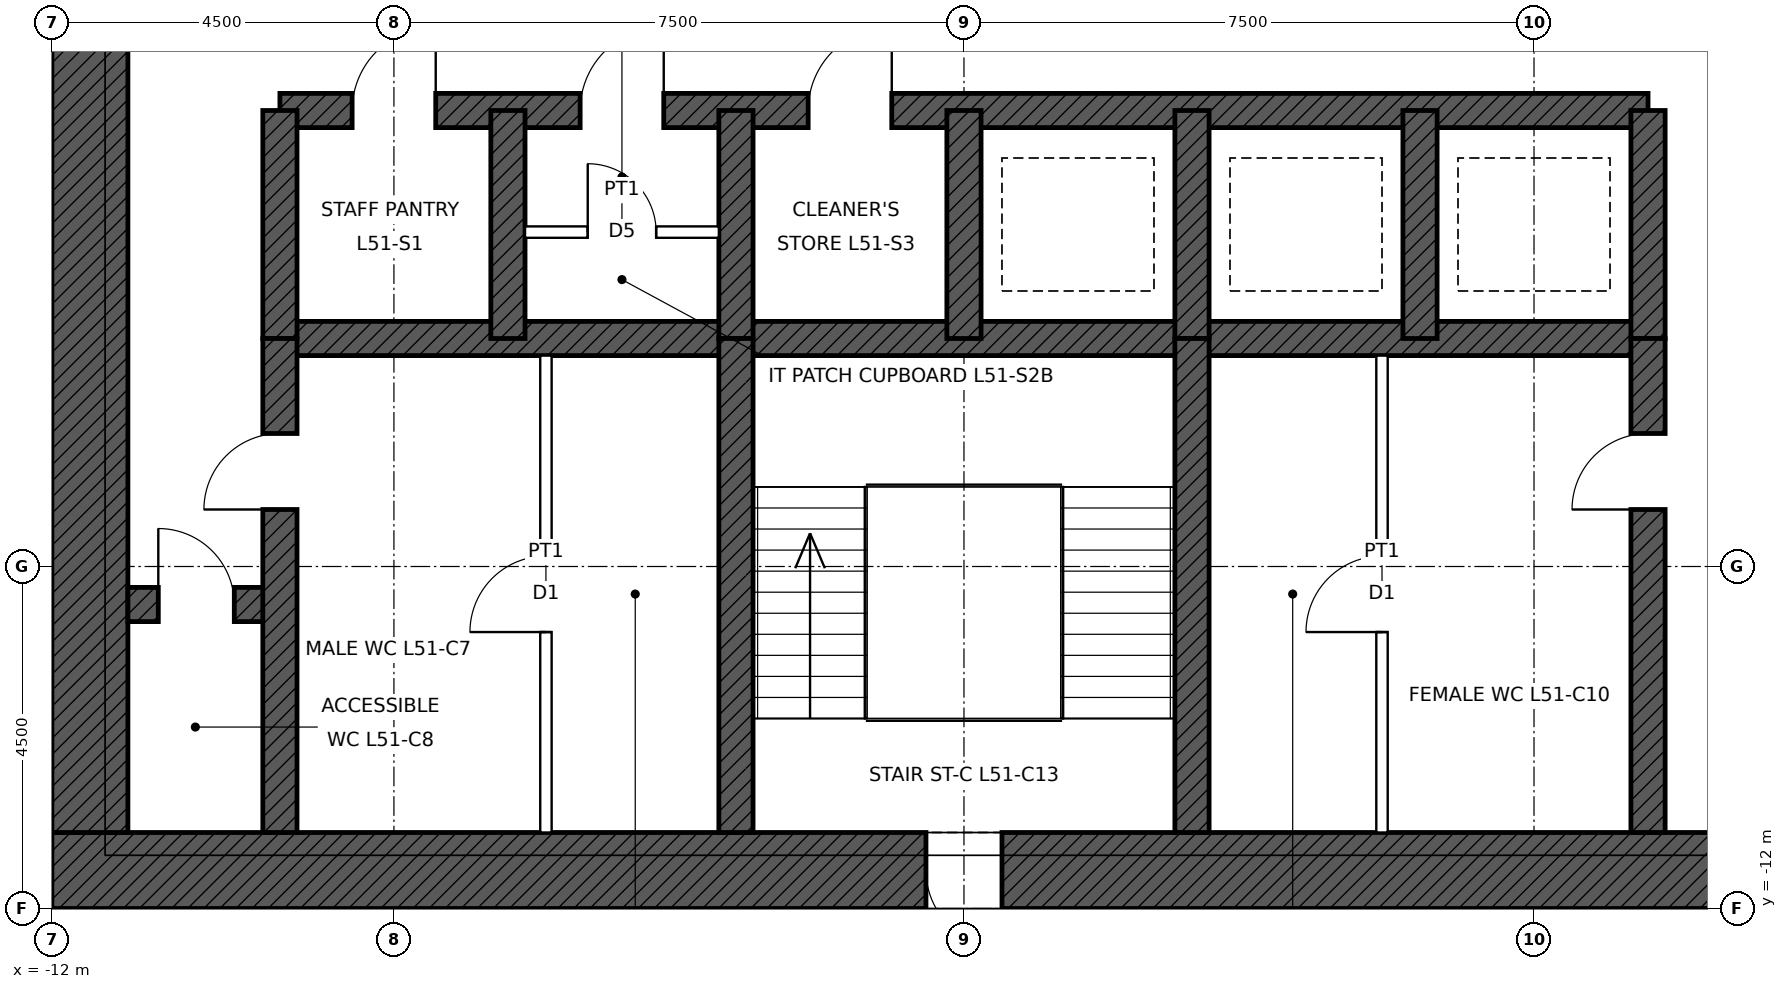
"""IFC4 building model, lengths in metres.
Left out: names, types, materials, properties, quantities, classifications, styles, units other than length and angle.
Written with IfcOpenShell. Run it as: python <this file> out.ifc"""

import sys

from ifc_helpers import new_model, si_unit, direction, frame, frame_2d, origin, place, context, subcontext, project, spatial, rectangle, extrude, element, fill, save


model = new_model("IFC4")
c1 = context("Model", 3, precision=1e-05, world=origin(), true_north=direction((0.0, 1.0)))
c2 = subcontext(c1, "Body", "Model", "MODEL_VIEW")
j1 = project(units=[si_unit("LENGTHUNIT", "METRE"), si_unit("PLANEANGLEUNIT", "RADIAN")], contexts=[c1])
p1 = place(None, origin())
s1 = spatial("IfcSite", under=j1, at=p1, CompositionType="ELEMENT")
p2 = place(p1, origin())
s2 = spatial("IfcBuilding", under=s1, at=p2, CompositionType="ELEMENT")
p3 = place(p2, frame((0.0, 0.0, 237.9)))
s3 = spatial("IfcBuildingStorey", under=s2, at=p3, CompositionType="ELEMENT", Elevation=237.9)
p4 = place(p3, frame((12.0, -11.5, 0.0), z_axis=(0.0, 0.0, 1.0), x_axis=(-1.0, 0.0, 0.0)))
e1 = element("IfcWall", 1, at=p4, inside=s3, PredefinedType="SHEAR", context=c2, shape_type="SweptSolid", body=[
    extrude(rectangle(XDim=24.0, YDim=1.0, at=frame_2d((12.0, 0.0))), origin(), (0.0, 0.0, 1.0), 4.0),
])
p5 = place(p4, frame((11.5, 0.0, 0.0)))
e2 = element("IfcOpeningElement", 2, at=p5, cuts=e1, PredefinedType="OPENING", context=c2, shape_type="SweptSolid", body=[
    extrude(rectangle(XDim=1.0, YDim=2.1, at=frame_2d((0.5, 1.05))), frame((0.0, 0.51, 0.0), z_axis=(0.0, -1.0, 0.0), x_axis=(1.0, 0.0, 0.0)), (0.0, 0.0, 1.0), 1.02),
])
p6 = place(p4, frame((1.0, 0.0, 0.0)))
e3 = element("IfcOpeningElement", 3, at=p6, cuts=e1, PredefinedType="OPENING", context=c2, shape_type="SweptSolid", body=[
    extrude(rectangle(XDim=1.0, YDim=2.4, at=frame_2d((0.5, 1.2))), frame((0.0, 0.51, 0.0), z_axis=(0.0, -1.0, 0.0), x_axis=(1.0, 0.0, 0.0)), (0.0, 0.0, 1.0), 1.02),
])
p7 = place(p3, frame((-11.5, -11.0, 0.0), z_axis=(0.0, 0.0, 1.0), x_axis=(0.0, 1.0, 0.0)))
e4 = element("IfcWall", 4, at=p7, inside=s3, PredefinedType="SHEAR", context=c2, shape_type="SweptSolid", body=[
    extrude(rectangle(XDim=22.0, YDim=1.0, at=frame_2d((11.0, 0.0))), origin(), (0.0, 0.0, 1.0), 4.0),
])
p8 = place(p7, frame((10.5, 0.0, 0.0)))
e5 = element("IfcOpeningElement", 5, at=p8, cuts=e4, PredefinedType="OPENING", context=c2, shape_type="SweptSolid", body=[
    extrude(rectangle(XDim=1.0, YDim=2.4, at=frame_2d((0.5, 1.2))), frame((0.0, 0.51, 0.0), z_axis=(0.0, -1.0, 0.0), x_axis=(1.0, 0.0, 0.0)), (0.0, 0.0, 1.0), 1.02),
])
p9 = place(p3, frame((-9.0, -1.5, 0.0), z_axis=(0.0, 0.0, 1.0), x_axis=(1.0, 0.0, 0.0)))
e6 = element("IfcWall", 6, at=p9, inside=s3, PredefinedType="SHEAR", context=c2, shape_type="SweptSolid", body=[
    extrude(rectangle(XDim=18.0, YDim=0.45, at=frame_2d((9.0, 0.0))), origin(), (0.0, 0.0, 1.0), 4.0),
])
p10 = place(p9, frame((0.95, 0.0, 0.0)))
e7 = element("IfcOpeningElement", 7, at=p10, cuts=e6, PredefinedType="OPENING", context=c2, shape_type="SweptSolid", body=[
    extrude(rectangle(XDim=1.1, YDim=2.1, at=frame_2d((0.55, 1.05))), frame((0.0, 0.235, 0.0), z_axis=(0.0, -1.0, 0.0), x_axis=(1.0, 0.0, 0.0)), (0.0, 0.0, 1.0), 0.47),
])
p11 = place(p9, frame((3.95, 0.0, 0.0)))
e8 = element("IfcOpeningElement", 8, at=p11, cuts=e6, PredefinedType="OPENING", context=c2, shape_type="SweptSolid", body=[
    extrude(rectangle(XDim=1.1, YDim=2.1, at=frame_2d((0.55, 1.05))), frame((0.0, 0.235, 0.0), z_axis=(0.0, -1.0, 0.0), x_axis=(1.0, 0.0, 0.0)), (0.0, 0.0, 1.0), 0.47),
])
p12 = place(p9, frame((6.95, 0.0, 0.0)))
e9 = element("IfcOpeningElement", 9, at=p12, cuts=e6, PredefinedType="OPENING", context=c2, shape_type="SweptSolid", body=[
    extrude(rectangle(XDim=1.1, YDim=2.1, at=frame_2d((0.55, 1.05))), frame((0.0, 0.235, 0.0), z_axis=(0.0, -1.0, 0.0), x_axis=(1.0, 0.0, 0.0)), (0.0, 0.0, 1.0), 0.47),
])
p13 = place(p3, frame((-9.0, -4.5, 0.0), z_axis=(0.0, 0.0, 1.0), x_axis=(1.0, 0.0, 0.0)))
e10 = element("IfcWall", 10, at=p13, inside=s3, PredefinedType="SHEAR", context=c2, shape_type="SweptSolid", body=[
    extrude(rectangle(XDim=18.0, YDim=0.45, at=frame_2d((9.0, 0.0))), origin(), (0.0, 0.0, 1.0), 4.0),
])
p14 = place(p3, frame((-11.0, -8.0, 0.0), z_axis=(0.0, 0.0, 1.0), x_axis=(1.0, 0.0, 0.0)))
e11 = element("IfcWall", 11, at=p14, inside=s3, PredefinedType="SHEAR", context=c2, shape_type="SweptSolid", body=[
    extrude(rectangle(XDim=2.0, YDim=0.45, at=frame_2d((1.0, 0.0))), origin(), (0.0, 0.0, 1.0), 4.0),
])
p15 = place(p14, frame((0.4, 0.0, 0.0)))
e12 = element("IfcOpeningElement", 12, at=p15, cuts=e11, PredefinedType="OPENING", context=c2, shape_type="SweptSolid", body=[
    extrude(rectangle(XDim=1.0, YDim=2.1, at=frame_2d((0.5, 1.05))), frame((0.0, 0.235, 0.0), z_axis=(0.0, -1.0, 0.0), x_axis=(1.0, 0.0, 0.0)), (0.0, 0.0, 1.0), 0.47),
])
for number, where, z_axis, x_axis in (
    (13, (-9.0, -4.5, 0.0), (0.0, 0.0, 1.0), (0.0, 1.0, 0.0)),
    (14, (9.0, -4.5, 0.0), (0.0, 0.0, 1.0), (0.0, 1.0, 0.0)),
    (15, (-6.0, -4.5, 0.0), (0.0, 0.0, 1.0), (0.0, 1.0, 0.0)),
    (16, (-3.0, -4.5, 0.0), (0.0, 0.0, 1.0), (0.0, 1.0, 0.0)),
    (17, (0.0, -4.5, 0.0), (0.0, 0.0, 1.0), (0.0, 1.0, 0.0)),
    (18, (3.0, -4.5, 0.0), (0.0, 0.0, 1.0), (0.0, 1.0, 0.0)),
    (19, (6.0, -4.5, 0.0), (0.0, 0.0, 1.0), (0.0, 1.0, 0.0)),
):
    element("IfcWall", number, at=place(p3, frame(where, z_axis=z_axis, x_axis=x_axis)), inside=s3, PredefinedType="SHEAR", context=c2, shape_type="SweptSolid", body=[
        extrude(rectangle(XDim=3.0, YDim=0.45, at=frame_2d((1.5, 0.0))), origin(), (0.0, 0.0, 1.0), 4.0),
    ])
p16 = place(p3, frame((-9.0, -11.0, 0.0), z_axis=(0.0, 0.0, 1.0), x_axis=(0.0, 1.0, 0.0)))
e20 = element("IfcWall", 20, at=p16, inside=s3, PredefinedType="SHEAR", context=c2, shape_type="SweptSolid", body=[
    extrude(rectangle(XDim=6.5, YDim=0.45, at=frame_2d((3.25, 0.0))), origin(), (0.0, 0.0, 1.0), 4.0),
])
p17 = place(p16, frame((4.25, 0.0, 0.0)))
e21 = element("IfcOpeningElement", 21, at=p17, cuts=e20, PredefinedType="OPENING", context=c2, shape_type="SweptSolid", body=[
    extrude(rectangle(XDim=1.0, YDim=2.1, at=frame_2d((0.5, 1.05))), frame((0.0, 0.235, 0.0), z_axis=(0.0, -1.0, 0.0), x_axis=(1.0, 0.0, 0.0)), (0.0, 0.0, 1.0), 0.47),
])
p18 = place(p3, frame((9.0, -11.0, 0.0), z_axis=(0.0, 0.0, 1.0), x_axis=(0.0, 1.0, 0.0)))
e22 = element("IfcWall", 22, at=p18, inside=s3, PredefinedType="SHEAR", context=c2, shape_type="SweptSolid", body=[
    extrude(rectangle(XDim=6.5, YDim=0.45, at=frame_2d((3.25, 0.0))), origin(), (0.0, 0.0, 1.0), 4.0),
])
p19 = place(p18, frame((4.25, 0.0, 0.0)))
e23 = element("IfcOpeningElement", 23, at=p19, cuts=e22, PredefinedType="OPENING", context=c2, shape_type="SweptSolid", body=[
    extrude(rectangle(XDim=1.0, YDim=2.1, at=frame_2d((0.5, 1.05))), frame((0.0, 0.235, 0.0), z_axis=(0.0, -1.0, 0.0), x_axis=(1.0, 0.0, 0.0)), (0.0, 0.0, 1.0), 0.47),
])
for number, where, z_axis, x_axis in (
    (24, (-3.0, -11.0, 0.0), (0.0, 0.0, 1.0), (0.0, 1.0, 0.0)),
    (25, (3.0, -11.0, 0.0), (0.0, 0.0, 1.0), (0.0, 1.0, 0.0)),
):
    element("IfcWall", number, at=place(p3, frame(where, z_axis=z_axis, x_axis=x_axis)), inside=s3, PredefinedType="SHEAR", context=c2, shape_type="SweptSolid", body=[
        extrude(rectangle(XDim=6.5, YDim=0.45, at=frame_2d((3.25, 0.0))), origin(), (0.0, 0.0, 1.0), 4.0),
    ])
p20 = place(p3, frame((-5.5, -11.0, 0.0), z_axis=(0.0, 0.0, 1.0), x_axis=(0.0, 1.0, 0.0)))
e26 = element("IfcWall", 26, at=p20, inside=s3, PredefinedType="PARTITIONING", context=c2, shape_type="SweptSolid", body=[
    extrude(rectangle(XDim=6.275, YDim=0.15, at=frame_2d((3.137, 0.0))), origin(), (0.0, 0.0, 1.0), 3.75),
])
p21 = place(p20, frame((2.637, 0.0, 0.0)))
e27 = element("IfcOpeningElement", 27, at=p21, cuts=e26, PredefinedType="OPENING", context=c2, shape_type="SweptSolid", body=[
    extrude(rectangle(XDim=1.0, YDim=2.1, at=frame_2d((0.5, 1.05))), frame((0.0, 0.085, 0.0), z_axis=(0.0, -1.0, 0.0), x_axis=(1.0, 0.0, 0.0)), (0.0, 0.0, 1.0), 0.17),
])
p22 = place(p3, frame((5.5, -11.0, 0.0), z_axis=(0.0, 0.0, 1.0), x_axis=(0.0, 1.0, 0.0)))
e28 = element("IfcWall", 28, at=p22, inside=s3, PredefinedType="PARTITIONING", context=c2, shape_type="SweptSolid", body=[
    extrude(rectangle(XDim=6.275, YDim=0.15, at=frame_2d((3.137, 0.0))), origin(), (0.0, 0.0, 1.0), 3.75),
])
p23 = place(p22, frame((2.637, 0.0, 0.0)))
e29 = element("IfcOpeningElement", 29, at=p23, cuts=e28, PredefinedType="OPENING", context=c2, shape_type="SweptSolid", body=[
    extrude(rectangle(XDim=1.0, YDim=2.1, at=frame_2d((0.5, 1.05))), frame((0.0, 0.085, 0.0), z_axis=(0.0, -1.0, 0.0), x_axis=(1.0, 0.0, 0.0)), (0.0, 0.0, 1.0), 0.17),
])
p24 = place(p3, frame((-5.775, -3.1, 0.0), z_axis=(0.0, 0.0, 1.0), x_axis=(1.0, 0.0, 0.0)))
e30 = element("IfcWall", 30, at=p24, inside=s3, PredefinedType="PARTITIONING", context=c2, shape_type="SweptSolid", body=[
    extrude(rectangle(XDim=2.55, YDim=0.15, at=frame_2d((1.275, 0.0))), origin(), (0.0, 0.0, 1.0), 3.75),
])
p25 = place(p24, frame((0.825, 0.0, 0.0)))
e31 = element("IfcOpeningElement", 31, at=p25, cuts=e30, PredefinedType="OPENING", context=c2, shape_type="SweptSolid", body=[
    extrude(rectangle(XDim=0.9, YDim=2.1, at=frame_2d((0.45, 1.05))), frame((0.0, 0.085, 0.0), z_axis=(0.0, -1.0, 0.0), x_axis=(1.0, 0.0, 0.0)), (0.0, 0.0, 1.0), 0.17),
])
p26 = place(p5, origin())
e32 = element("IfcDoor", 32, at=p26, inside=s3, OperationType="SINGLE_SWING_LEFT", PredefinedType="DOOR", context=c2, shape_type="SweptSolid", body=[
    extrude(rectangle(XDim=1.0, YDim=2.1, at=frame_2d((0.5, 1.05))), frame((0.0, 0.485, 0.0), z_axis=(0.0, -1.0, 0.0), x_axis=(1.0, 0.0, 0.0)), (0.0, 0.0, 1.0), 0.05),
])
fill(e2, e32)
p27 = place(p17, origin())
e33 = element("IfcDoor", 33, at=p27, inside=s3, OperationType="SINGLE_SWING_LEFT", PredefinedType="DOOR", context=c2, shape_type="SweptSolid", body=[
    extrude(rectangle(XDim=1.0, YDim=2.1, at=frame_2d((0.5, 1.05))), frame((0.0, 0.025, 0.0), z_axis=(0.0, -1.0, 0.0), x_axis=(1.0, 0.0, 0.0)), (0.0, 0.0, 1.0), 0.05),
])
fill(e21, e33)
p28 = place(p19, origin())
e34 = element("IfcDoor", 34, at=p28, inside=s3, OperationType="SINGLE_SWING_LEFT", PredefinedType="DOOR", context=c2, shape_type="SweptSolid", body=[
    extrude(rectangle(XDim=1.0, YDim=2.1, at=frame_2d((0.5, 1.05))), frame((0.0, 0.025, 0.0), z_axis=(0.0, -1.0, 0.0), x_axis=(1.0, 0.0, 0.0)), (0.0, 0.0, 1.0), 0.05),
])
fill(e23, e34)
p29 = place(p15, origin())
e35 = element("IfcDoor", 35, at=p29, inside=s3, OperationType="SINGLE_SWING_LEFT", PredefinedType="DOOR", context=c2, shape_type="SweptSolid", body=[
    extrude(rectangle(XDim=1.0, YDim=2.1, at=frame_2d((0.5, 1.05))), frame((0.0, 0.025, 0.0), z_axis=(0.0, -1.0, 0.0), x_axis=(1.0, 0.0, 0.0)), (0.0, 0.0, 1.0), 0.05),
])
fill(e12, e35)
p30 = place(p21, origin())
e36 = element("IfcDoor", 36, at=p30, inside=s3, OperationType="SINGLE_SWING_LEFT", PredefinedType="DOOR", context=c2, shape_type="SweptSolid", body=[
    extrude(rectangle(XDim=1.0, YDim=2.1, at=frame_2d((0.5, 1.05))), frame((0.0, 0.025, 0.0), z_axis=(0.0, -1.0, 0.0), x_axis=(1.0, 0.0, 0.0)), (0.0, 0.0, 1.0), 0.05),
])
fill(e27, e36)
p31 = place(p23, origin())
e37 = element("IfcDoor", 37, at=p31, inside=s3, OperationType="SINGLE_SWING_LEFT", PredefinedType="DOOR", context=c2, shape_type="SweptSolid", body=[
    extrude(rectangle(XDim=1.0, YDim=2.1, at=frame_2d((0.5, 1.05))), frame((0.0, 0.025, 0.0), z_axis=(0.0, -1.0, 0.0), x_axis=(1.0, 0.0, 0.0)), (0.0, 0.0, 1.0), 0.05),
])
fill(e29, e37)
p32 = place(p10, origin())
e38 = element("IfcDoor", 38, at=p32, inside=s3, OperationType="SINGLE_SWING_RIGHT", PredefinedType="DOOR", context=c2, shape_type="SweptSolid", body=[
    extrude(rectangle(XDim=1.1, YDim=2.1, at=frame_2d((0.55, 1.05))), frame((0.0, 0.025, 0.0), z_axis=(0.0, -1.0, 0.0), x_axis=(1.0, 0.0, 0.0)), (0.0, 0.0, 1.0), 0.05),
])
fill(e7, e38)
p33 = place(p11, origin())
e39 = element("IfcDoor", 39, at=p33, inside=s3, OperationType="SINGLE_SWING_RIGHT", PredefinedType="DOOR", context=c2, shape_type="SweptSolid", body=[
    extrude(rectangle(XDim=1.1, YDim=2.1, at=frame_2d((0.55, 1.05))), frame((0.0, 0.025, 0.0), z_axis=(0.0, -1.0, 0.0), x_axis=(1.0, 0.0, 0.0)), (0.0, 0.0, 1.0), 0.05),
])
fill(e8, e39)
p34 = place(p25, origin())
e40 = element("IfcDoor", 40, at=p34, inside=s3, OperationType="SINGLE_SWING_LEFT", PredefinedType="DOOR", context=c2, shape_type="SweptSolid", body=[
    extrude(rectangle(XDim=0.9, YDim=2.1, at=frame_2d((0.45, 1.05))), frame((0.0, 0.025, 0.0), z_axis=(0.0, -1.0, 0.0), x_axis=(1.0, 0.0, 0.0)), (0.0, 0.0, 1.0), 0.05),
])
fill(e31, e40)
p35 = place(p12, origin())
e41 = element("IfcDoor", 41, at=p35, inside=s3, OperationType="SINGLE_SWING_RIGHT", PredefinedType="DOOR", context=c2, shape_type="SweptSolid", body=[
    extrude(rectangle(XDim=1.1, YDim=2.1, at=frame_2d((0.55, 1.05))), frame((0.0, 0.025, 0.0), z_axis=(0.0, -1.0, 0.0), x_axis=(1.0, 0.0, 0.0)), (0.0, 0.0, 1.0), 0.05),
])
fill(e9, e41)
save(model, sys.argv[1])
